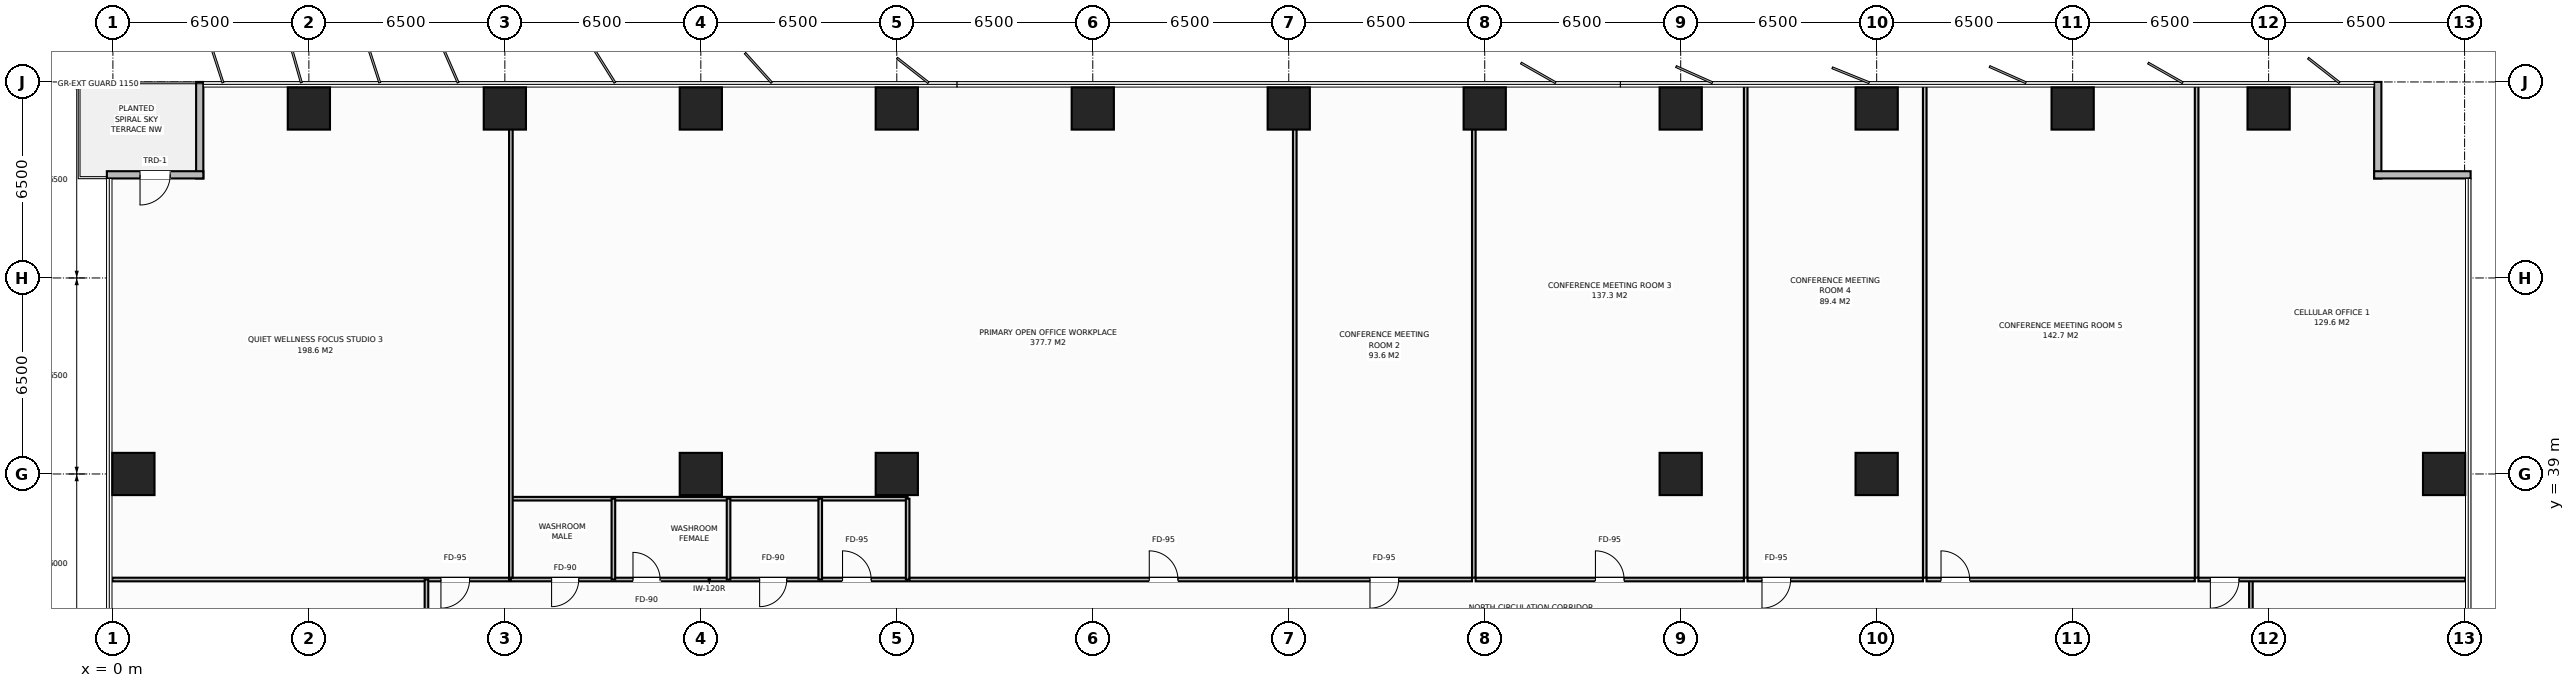
"""IFC4 building model, lengths in metres.
Left out: names, types, materials, properties, quantities, classifications, styles, units other than length and angle.
Written with IfcOpenShell. Run it as: python <this file> out.ifc"""

import sys

from ifc_helpers import new_model, si_unit, direction, frame, frame_2d, origin, origin_2d, place, context, subcontext, project, spatial, rectangle, extrude, element, fill, save


model = new_model("IFC4")
c1 = context("Model", 3, precision=1e-05, world=origin(), true_north=direction((0.0, 1.0)))
c2 = subcontext(c1, "Body", "Model", "MODEL_VIEW")
j1 = project(units=[si_unit("LENGTHUNIT", "METRE"), si_unit("PLANEANGLEUNIT", "RADIAN")], contexts=[c1])
p1 = place(None, origin())
s1 = spatial("IfcSite", under=j1, at=p1, CompositionType="ELEMENT")
p2 = place(p1, origin())
s2 = spatial("IfcBuilding", under=s1, at=p2, CompositionType="ELEMENT")
p3 = place(p2, frame((0.0, 0.0, 73.4)))
s3 = spatial("IfcBuildingStorey", under=s2, at=p3, CompositionType="ELEMENT", Elevation=73.4)
for number, where, z_axis, x_axis in (
    (1, (19.5, 39.0, 0.0), (0.0, 0.0, 1.0), (1.0, 0.0, 0.0)),
    (2, (58.5, 39.0, 0.0), (0.0, 0.0, 1.0), (1.0, 0.0, 0.0)),
    (3, (26.0, 39.0, 0.0), (0.0, 0.0, 1.0), (1.0, 0.0, 0.0)),
    (4, (52.0, 39.0, 0.0), (0.0, 0.0, 1.0), (1.0, 0.0, 0.0)),
    (5, (6.5, 51.12, 0.0), (0.0, 0.0, 1.0), (1.0, 0.0, 0.0)),
    (6, (13.0, 51.12, 0.0), (0.0, 0.0, 1.0), (1.0, 0.0, 0.0)),
    (7, (19.5, 51.12, 0.0), (0.0, 0.0, 1.0), (1.0, 0.0, 0.0)),
    (8, (26.0, 51.12, 0.0), (0.0, 0.0, 1.0), (1.0, 0.0, 0.0)),
    (9, (32.5, 51.12, 0.0), (0.0, 0.0, 1.0), (1.0, 0.0, 0.0)),
    (10, (39.0, 51.12, 0.0), (0.0, 0.0, 1.0), (1.0, 0.0, 0.0)),
    (11, (45.5, 51.12, 0.0), (0.0, 0.0, 1.0), (1.0, 0.0, 0.0)),
    (12, (52.0, 51.12, 0.0), (0.0, 0.0, 1.0), (1.0, 0.0, 0.0)),
    (13, (58.5, 51.12, 0.0), (0.0, 0.0, 1.0), (1.0, 0.0, 0.0)),
    (14, (65.0, 51.12, 0.0), (0.0, 0.0, 1.0), (1.0, 0.0, 0.0)),
    (15, (71.5, 51.12, 0.0), (0.0, 0.0, 1.0), (1.0, 0.0, 0.0)),
    (16, (0.68, 39.0, 0.0), (0.0, 0.0, 1.0), (1.0, 0.0, 0.0)),
    (17, (77.32, 39.0, 0.0), (0.0, 0.0, 1.0), (1.0, 0.0, 0.0)),
):
    element("IfcColumn", number, at=place(p3, frame(where, z_axis=z_axis, x_axis=x_axis)), inside=s3, PredefinedType="COLUMN", context=c2, shape_type="SweptSolid", body=[
        extrude(rectangle(XDim=1.4, YDim=1.4, at=origin_2d()), origin(), (0.0, 0.0, 1.0), 3.8),
    ])
p4 = place(p3, frame((2.88, 48.8, 0.0), z_axis=(0.0, 0.0, 1.0), x_axis=(0.0, 1.0, 0.0)))
e18 = element("IfcWall", 18, at=p4, inside=s3, PredefinedType="STANDARD", context=c2, shape_type="SweptSolid", body=[
    extrude(rectangle(XDim=3.2, YDim=0.24, at=frame_2d((1.6, 0.0))), origin(), (0.0, 0.0, 1.0), 3.55),
])
p5 = place(p3, frame((-0.2, 48.92, 0.0), z_axis=(0.0, 0.0, 1.0), x_axis=(1.0, 0.0, 0.0)))
e19 = element("IfcWall", 19, at=p5, inside=s3, PredefinedType="STANDARD", context=c2, shape_type="SweptSolid", body=[
    extrude(rectangle(XDim=3.2, YDim=0.24, at=frame_2d((1.6, 0.0))), origin(), (0.0, 0.0, 1.0), 3.55),
])
p6 = place(p5, frame((1.1, 0.0, 0.0)))
e20 = element("IfcOpeningElement", 20, at=p6, cuts=e19, PredefinedType="OPENING", context=c2, shape_type="SweptSolid", body=[
    extrude(rectangle(XDim=1.0, YDim=2.2, at=frame_2d((0.5, 1.1))), frame((0.0, 0.13, 0.0), z_axis=(0.0, -1.0, 0.0), x_axis=(1.0, 0.0, 0.0)), (0.0, 0.0, 1.0), 0.26),
])
for number, where, z_axis, x_axis in (
    (21, (75.12, 52.0, 0.0), (0.0, 0.0, 1.0), (0.0, -1.0, 0.0)),
    (22, (75.0, 48.92, 0.0), (0.0, 0.0, 1.0), (1.0, 0.0, 0.0)),
):
    element("IfcWall", number, at=place(p3, frame(where, z_axis=z_axis, x_axis=x_axis)), inside=s3, PredefinedType="STANDARD", context=c2, shape_type="SweptSolid", body=[
        extrude(rectangle(XDim=3.2, YDim=0.24, at=frame_2d((1.6, 0.0))), origin(), (0.0, 0.0, 1.0), 3.55),
    ])
p7 = place(p3, frame((70.912, 33.4, 0.0), z_axis=(0.0, 0.0, 1.0), x_axis=(0.0, 1.0, 0.0)))
e23 = element("IfcWall", 23, at=p7, inside=s3, PredefinedType="PARTITIONING", context=c2, shape_type="SweptSolid", body=[
    extrude(rectangle(XDim=2.1, YDim=0.12, at=frame_2d((1.05, 0.0))), origin(), (0.0, 0.0, 1.0), 3.55),
])
p8 = place(p3, frame((13.2, 35.5, 0.0), z_axis=(0.0, 0.0, 1.0), x_axis=(1.0, 0.0, 0.0)))
e24 = element("IfcWall", 24, at=p8, inside=s3, PredefinedType="PARTITIONING", context=c2, shape_type="SweptSolid", body=[
    extrude(rectangle(XDim=13.16, YDim=0.12, at=frame_2d((6.58, 0.0))), origin(), (0.0, 0.0, 1.0), 3.55),
])
p9 = place(p8, frame((1.35, 0.0, 0.0)))
e25 = element("IfcOpeningElement", 25, at=p9, cuts=e24, PredefinedType="OPENING", context=c2, shape_type="SweptSolid", body=[
    extrude(rectangle(XDim=0.9, YDim=2.15, at=frame_2d((0.45, 1.075))), frame((0.0, 0.07, 0.0), z_axis=(0.0, -1.0, 0.0), x_axis=(1.0, 0.0, 0.0)), (0.0, 0.0, 1.0), 0.14),
])
p10 = place(p8, frame((4.05, 0.0, 0.0)))
e26 = element("IfcOpeningElement", 26, at=p10, cuts=e24, PredefinedType="OPENING", context=c2, shape_type="SweptSolid", body=[
    extrude(rectangle(XDim=0.9, YDim=2.15, at=frame_2d((0.45, 1.075))), frame((0.0, 0.07, 0.0), z_axis=(0.0, -1.0, 0.0), x_axis=(1.0, 0.0, 0.0)), (0.0, 0.0, 1.0), 0.14),
])
p11 = place(p8, frame((8.25, 0.0, 0.0)))
e27 = element("IfcOpeningElement", 27, at=p11, cuts=e24, PredefinedType="OPENING", context=c2, shape_type="SweptSolid", body=[
    extrude(rectangle(XDim=0.9, YDim=2.15, at=frame_2d((0.45, 1.075))), frame((0.0, 0.07, 0.0), z_axis=(0.0, -1.0, 0.0), x_axis=(1.0, 0.0, 0.0)), (0.0, 0.0, 1.0), 0.14),
])
p12 = place(p8, frame((11.0, 0.0, 0.0)))
e28 = element("IfcOpeningElement", 28, at=p12, cuts=e24, PredefinedType="OPENING", context=c2, shape_type="SweptSolid", body=[
    extrude(rectangle(XDim=0.95, YDim=2.15, at=frame_2d((0.475, 1.075))), frame((0.0, 0.07, 0.0), z_axis=(0.0, -1.0, 0.0), x_axis=(1.0, 0.0, 0.0)), (0.0, 0.0, 1.0), 0.14),
])
p13 = place(p3, frame((13.2, 38.18, 0.0), z_axis=(0.0, 0.0, 1.0), x_axis=(1.0, 0.0, 0.0)))
e29 = element("IfcWall", 29, at=p13, inside=s3, PredefinedType="PARTITIONING", context=c2, shape_type="SweptSolid", body=[
    extrude(rectangle(XDim=13.16, YDim=0.12, at=frame_2d((6.58, 0.0))), origin(), (0.0, 0.0, 1.0), 3.55),
])
for number, where, z_axis, x_axis in (
    (30, (16.6, 35.5, 0.0), (0.0, 0.0, 1.0), (0.0, 1.0, 0.0)),
    (31, (20.42, 35.5, 0.0), (0.0, 0.0, 1.0), (0.0, 1.0, 0.0)),
    (32, (23.46, 35.5, 0.0), (0.0, 0.0, 1.0), (0.0, 1.0, 0.0)),
    (33, (26.36, 35.5, 0.0), (0.0, 0.0, 1.0), (0.0, 1.0, 0.0)),
):
    element("IfcWall", number, at=place(p3, frame(where, z_axis=z_axis, x_axis=x_axis)), inside=s3, PredefinedType="PARTITIONING", context=c2, shape_type="SweptSolid", body=[
        extrude(rectangle(XDim=2.68, YDim=0.12, at=frame_2d((1.34, 0.0))), origin(), (0.0, 0.0, 1.0), 3.55),
    ])
p14 = place(p3, frame((13.2, 35.56, 0.0), z_axis=(0.0, 0.0, 1.0), x_axis=(0.0, 1.0, 0.0)))
e34 = element("IfcWall", 34, at=p14, inside=s3, PredefinedType="PARTITIONING", context=c2, shape_type="SweptSolid", body=[
    extrude(rectangle(XDim=16.42, YDim=0.12, at=frame_2d((8.21, 0.0))), origin(), (0.0, 0.0, 1.0), 2.9),
])
p15 = place(p3, frame((-0.02, 35.5, 0.0), z_axis=(0.0, 0.0, 1.0), x_axis=(1.0, 0.0, 0.0)))
e35 = element("IfcWall", 35, at=p15, inside=s3, PredefinedType="PARTITIONING", context=c2, shape_type="SweptSolid", body=[
    extrude(rectangle(XDim=13.16, YDim=0.12, at=frame_2d((6.58, 0.0))), origin(), (0.0, 0.0, 1.0), 3.55),
])
p16 = place(p15, frame((10.9, 0.0, 0.0)))
e36 = element("IfcOpeningElement", 36, at=p16, cuts=e35, PredefinedType="OPENING", context=c2, shape_type="SweptSolid", body=[
    extrude(rectangle(XDim=0.95, YDim=2.15, at=frame_2d((0.475, 1.075))), frame((0.0, 0.07, 0.0), z_axis=(0.0, -1.0, 0.0), x_axis=(1.0, 0.0, 0.0)), (0.0, 0.0, 1.0), 0.14),
])
p17 = place(p3, frame((39.2, 35.56, 0.0), z_axis=(0.0, 0.0, 1.0), x_axis=(0.0, 1.0, 0.0)))
e37 = element("IfcWall", 37, at=p17, inside=s3, PredefinedType="PARTITIONING", context=c2, shape_type="SweptSolid", body=[
    extrude(rectangle(XDim=16.42, YDim=0.12, at=frame_2d((8.21, 0.0))), origin(), (0.0, 0.0, 1.0), 2.9),
])
p18 = place(p3, frame((26.42, 35.5, 0.0), z_axis=(0.0, 0.0, 1.0), x_axis=(1.0, 0.0, 0.0)))
e38 = element("IfcWall", 38, at=p18, inside=s3, PredefinedType="PARTITIONING", context=c2, shape_type="SweptSolid", body=[
    extrude(rectangle(XDim=12.72, YDim=0.12, at=frame_2d((6.36, 0.0))), origin(), (0.0, 0.0, 1.0), 3.55),
])
p19 = place(p18, frame((7.954, 0.0, 0.0)))
e39 = element("IfcOpeningElement", 39, at=p19, cuts=e38, PredefinedType="OPENING", context=c2, shape_type="SweptSolid", body=[
    extrude(rectangle(XDim=0.95, YDim=2.15, at=frame_2d((0.475, 1.075))), frame((0.0, 0.07, 0.0), z_axis=(0.0, -1.0, 0.0), x_axis=(1.0, 0.0, 0.0)), (0.0, 0.0, 1.0), 0.14),
])
p20 = place(p3, frame((45.138, 35.56, 0.0), z_axis=(0.0, 0.0, 1.0), x_axis=(0.0, 1.0, 0.0)))
e40 = element("IfcWall", 40, at=p20, inside=s3, PredefinedType="PARTITIONING", context=c2, shape_type="SweptSolid", body=[
    extrude(rectangle(XDim=16.42, YDim=0.12, at=frame_2d((8.21, 0.0))), origin(), (0.0, 0.0, 1.0), 3.55),
])
p21 = place(p3, frame((39.26, 35.5, 0.0), z_axis=(0.0, 0.0, 1.0), x_axis=(1.0, 0.0, 0.0)))
e41 = element("IfcWall", 41, at=p21, inside=s3, PredefinedType="PARTITIONING", context=c2, shape_type="SweptSolid", body=[
    extrude(rectangle(XDim=5.819, YDim=0.12, at=frame_2d((2.909, 0.0))), origin(), (0.0, 0.0, 1.0), 3.55),
])
p22 = place(p21, frame((2.434, 0.0, 0.0)))
e42 = element("IfcOpeningElement", 42, at=p22, cuts=e41, PredefinedType="OPENING", context=c2, shape_type="SweptSolid", body=[
    extrude(rectangle(XDim=0.95, YDim=2.15, at=frame_2d((0.475, 1.075))), frame((0.0, 0.07, 0.0), z_axis=(0.0, -1.0, 0.0), x_axis=(1.0, 0.0, 0.0)), (0.0, 0.0, 1.0), 0.14),
])
p23 = place(p3, frame((54.156, 35.56, 0.0), z_axis=(0.0, 0.0, 1.0), x_axis=(0.0, 1.0, 0.0)))
e43 = element("IfcWall", 43, at=p23, inside=s3, PredefinedType="PARTITIONING", context=c2, shape_type="SweptSolid", body=[
    extrude(rectangle(XDim=16.42, YDim=0.12, at=frame_2d((8.21, 0.0))), origin(), (0.0, 0.0, 1.0), 3.55),
])
p24 = place(p3, frame((45.198, 35.5, 0.0), z_axis=(0.0, 0.0, 1.0), x_axis=(1.0, 0.0, 0.0)))
e44 = element("IfcWall", 44, at=p24, inside=s3, PredefinedType="PARTITIONING", context=c2, shape_type="SweptSolid", body=[
    extrude(rectangle(XDim=8.898, YDim=0.12, at=frame_2d((4.449, 0.0))), origin(), (0.0, 0.0, 1.0), 3.55),
])
p25 = place(p24, frame((3.974, 0.0, 0.0)))
e45 = element("IfcOpeningElement", 45, at=p25, cuts=e44, PredefinedType="OPENING", context=c2, shape_type="SweptSolid", body=[
    extrude(rectangle(XDim=0.95, YDim=2.15, at=frame_2d((0.475, 1.075))), frame((0.0, 0.07, 0.0), z_axis=(0.0, -1.0, 0.0), x_axis=(1.0, 0.0, 0.0)), (0.0, 0.0, 1.0), 0.14),
])
p26 = place(p3, frame((60.094, 35.56, 0.0), z_axis=(0.0, 0.0, 1.0), x_axis=(0.0, 1.0, 0.0)))
e46 = element("IfcWall", 46, at=p26, inside=s3, PredefinedType="PARTITIONING", context=c2, shape_type="SweptSolid", body=[
    extrude(rectangle(XDim=16.42, YDim=0.12, at=frame_2d((8.21, 0.0))), origin(), (0.0, 0.0, 1.0), 3.55),
])
p27 = place(p3, frame((54.216, 35.5, 0.0), z_axis=(0.0, 0.0, 1.0), x_axis=(1.0, 0.0, 0.0)))
e47 = element("IfcWall", 47, at=p27, inside=s3, PredefinedType="PARTITIONING", context=c2, shape_type="SweptSolid", body=[
    extrude(rectangle(XDim=5.819, YDim=0.12, at=frame_2d((2.909, 0.0))), origin(), (0.0, 0.0, 1.0), 3.55),
])
p28 = place(p27, frame((0.48, 0.0, 0.0)))
e48 = element("IfcOpeningElement", 48, at=p28, cuts=e47, PredefinedType="OPENING", context=c2, shape_type="SweptSolid", body=[
    extrude(rectangle(XDim=0.95, YDim=2.15, at=frame_2d((0.475, 1.075))), frame((0.0, 0.07, 0.0), z_axis=(0.0, -1.0, 0.0), x_axis=(1.0, 0.0, 0.0)), (0.0, 0.0, 1.0), 0.14),
])
p29 = place(p3, frame((69.112, 35.56, 0.0), z_axis=(0.0, 0.0, 1.0), x_axis=(0.0, 1.0, 0.0)))
e49 = element("IfcWall", 49, at=p29, inside=s3, PredefinedType="PARTITIONING", context=c2, shape_type="SweptSolid", body=[
    extrude(rectangle(XDim=16.42, YDim=0.12, at=frame_2d((8.21, 0.0))), origin(), (0.0, 0.0, 1.0), 3.55),
])
p30 = place(p3, frame((60.155, 35.5, 0.0), z_axis=(0.0, 0.0, 1.0), x_axis=(1.0, 0.0, 0.0)))
e50 = element("IfcWall", 50, at=p30, inside=s3, PredefinedType="PARTITIONING", context=c2, shape_type="SweptSolid", body=[
    extrude(rectangle(XDim=8.898, YDim=0.12, at=frame_2d((4.449, 0.0))), origin(), (0.0, 0.0, 1.0), 3.55),
])
p31 = place(p30, frame((0.48, 0.0, 0.0)))
e51 = element("IfcOpeningElement", 51, at=p31, cuts=e50, PredefinedType="OPENING", context=c2, shape_type="SweptSolid", body=[
    extrude(rectangle(XDim=0.95, YDim=2.15, at=frame_2d((0.475, 1.075))), frame((0.0, 0.07, 0.0), z_axis=(0.0, -1.0, 0.0), x_axis=(1.0, 0.0, 0.0)), (0.0, 0.0, 1.0), 0.14),
])
p32 = place(p3, frame((69.172, 35.5, 0.0), z_axis=(0.0, 0.0, 1.0), x_axis=(1.0, 0.0, 0.0)))
e52 = element("IfcWall", 52, at=p32, inside=s3, PredefinedType="PARTITIONING", context=c2, shape_type="SweptSolid", body=[
    extrude(rectangle(XDim=8.848, YDim=0.12, at=frame_2d((4.424, 0.0))), origin(), (0.0, 0.0, 1.0), 3.55),
])
p33 = place(p32, frame((0.395, 0.0, 0.0)))
e53 = element("IfcOpeningElement", 53, at=p33, cuts=e52, PredefinedType="OPENING", context=c2, shape_type="SweptSolid", body=[
    extrude(rectangle(XDim=0.95, YDim=2.15, at=frame_2d((0.475, 1.075))), frame((0.0, 0.07, 0.0), z_axis=(0.0, -1.0, 0.0), x_axis=(1.0, 0.0, 0.0)), (0.0, 0.0, 1.0), 0.14),
])
p34 = place(p3, frame((10.4, 27.05, 0.0), z_axis=(0.0, 0.0, 1.0), x_axis=(0.0, 1.0, 0.0)))
e54 = element("IfcWall", 54, at=p34, inside=s3, PredefinedType="PARTITIONING", context=c2, shape_type="SweptSolid", body=[
    extrude(rectangle(XDim=8.45, YDim=0.12, at=frame_2d((4.225, 0.0))), origin(), (0.0, 0.0, 1.0), 3.55),
])
p35 = place(p34, frame((2.7, 0.0, 0.0)))
e55 = element("IfcOpeningElement", 55, at=p35, cuts=e54, PredefinedType="OPENING", context=c2, shape_type="SweptSolid", body=[
    extrude(rectangle(XDim=0.95, YDim=2.15, at=frame_2d((0.475, 1.075))), frame((0.0, 0.07, 0.0), z_axis=(0.0, -1.0, 0.0), x_axis=(1.0, 0.0, 0.0)), (0.0, 0.0, 1.0), 0.14),
])
p36 = place(p6, origin())
e56 = element("IfcDoor", 56, at=p36, inside=s3, OperationType="SINGLE_SWING_RIGHT", PredefinedType="DOOR", context=c2, shape_type="SweptSolid", body=[
    extrude(rectangle(XDim=1.0, YDim=2.2, at=frame_2d((0.5, 1.1))), frame((0.0, 0.025, 0.0), z_axis=(0.0, -1.0, 0.0), x_axis=(1.0, 0.0, 0.0)), (0.0, 0.0, 1.0), 0.05),
])
fill(e20, e56)
p37 = place(p9, origin())
e57 = element("IfcDoor", 57, at=p37, inside=s3, OperationType="SINGLE_SWING_RIGHT", PredefinedType="DOOR", context=c2, shape_type="SweptSolid", body=[
    extrude(rectangle(XDim=0.9, YDim=2.15, at=frame_2d((0.45, 1.075))), frame((0.0, 0.025, 0.0), z_axis=(0.0, -1.0, 0.0), x_axis=(1.0, 0.0, 0.0)), (0.0, 0.0, 1.0), 0.05),
])
fill(e25, e57)
p38 = place(p10, origin())
e58 = element("IfcDoor", 58, at=p38, inside=s3, OperationType="SINGLE_SWING_LEFT", PredefinedType="DOOR", context=c2, shape_type="SweptSolid", body=[
    extrude(rectangle(XDim=0.9, YDim=2.15, at=frame_2d((0.45, 1.075))), frame((0.0, 0.025, 0.0), z_axis=(0.0, -1.0, 0.0), x_axis=(1.0, 0.0, 0.0)), (0.0, 0.0, 1.0), 0.05),
])
fill(e26, e58)
p39 = place(p11, origin())
e59 = element("IfcDoor", 59, at=p39, inside=s3, OperationType="SINGLE_SWING_RIGHT", PredefinedType="DOOR", context=c2, shape_type="SweptSolid", body=[
    extrude(rectangle(XDim=0.9, YDim=2.15, at=frame_2d((0.45, 1.075))), frame((0.0, 0.025, 0.0), z_axis=(0.0, -1.0, 0.0), x_axis=(1.0, 0.0, 0.0)), (0.0, 0.0, 1.0), 0.05),
])
fill(e27, e59)
p40 = place(p12, origin())
e60 = element("IfcDoor", 60, at=p40, inside=s3, OperationType="SINGLE_SWING_LEFT", PredefinedType="DOOR", context=c2, shape_type="SweptSolid", body=[
    extrude(rectangle(XDim=0.95, YDim=2.15, at=frame_2d((0.475, 1.075))), frame((0.0, 0.025, 0.0), z_axis=(0.0, -1.0, 0.0), x_axis=(1.0, 0.0, 0.0)), (0.0, 0.0, 1.0), 0.05),
])
fill(e28, e60)
p41 = place(p16, origin())
e61 = element("IfcDoor", 61, at=p41, inside=s3, OperationType="SINGLE_SWING_RIGHT", PredefinedType="DOOR", context=c2, shape_type="SweptSolid", body=[
    extrude(rectangle(XDim=0.95, YDim=2.15, at=frame_2d((0.475, 1.075))), frame((0.0, 0.025, 0.0), z_axis=(0.0, -1.0, 0.0), x_axis=(1.0, 0.0, 0.0)), (0.0, 0.0, 1.0), 0.05),
])
fill(e36, e61)
p42 = place(p19, origin())
e62 = element("IfcDoor", 62, at=p42, inside=s3, OperationType="SINGLE_SWING_LEFT", PredefinedType="DOOR", context=c2, shape_type="SweptSolid", body=[
    extrude(rectangle(XDim=0.95, YDim=2.15, at=frame_2d((0.475, 1.075))), frame((0.0, 0.025, 0.0), z_axis=(0.0, -1.0, 0.0), x_axis=(1.0, 0.0, 0.0)), (0.0, 0.0, 1.0), 0.05),
])
fill(e39, e62)
p43 = place(p22, origin())
e63 = element("IfcDoor", 63, at=p43, inside=s3, OperationType="SINGLE_SWING_RIGHT", PredefinedType="DOOR", context=c2, shape_type="SweptSolid", body=[
    extrude(rectangle(XDim=0.95, YDim=2.15, at=frame_2d((0.475, 1.075))), frame((0.0, 0.025, 0.0), z_axis=(0.0, -1.0, 0.0), x_axis=(1.0, 0.0, 0.0)), (0.0, 0.0, 1.0), 0.05),
])
fill(e42, e63)
p44 = place(p25, origin())
e64 = element("IfcDoor", 64, at=p44, inside=s3, OperationType="SINGLE_SWING_LEFT", PredefinedType="DOOR", context=c2, shape_type="SweptSolid", body=[
    extrude(rectangle(XDim=0.95, YDim=2.15, at=frame_2d((0.475, 1.075))), frame((0.0, 0.025, 0.0), z_axis=(0.0, -1.0, 0.0), x_axis=(1.0, 0.0, 0.0)), (0.0, 0.0, 1.0), 0.05),
])
fill(e45, e64)
p45 = place(p28, origin())
e65 = element("IfcDoor", 65, at=p45, inside=s3, OperationType="SINGLE_SWING_RIGHT", PredefinedType="DOOR", context=c2, shape_type="SweptSolid", body=[
    extrude(rectangle(XDim=0.95, YDim=2.15, at=frame_2d((0.475, 1.075))), frame((0.0, 0.025, 0.0), z_axis=(0.0, -1.0, 0.0), x_axis=(1.0, 0.0, 0.0)), (0.0, 0.0, 1.0), 0.05),
])
fill(e48, e65)
p46 = place(p31, origin())
e66 = element("IfcDoor", 66, at=p46, inside=s3, OperationType="SINGLE_SWING_LEFT", PredefinedType="DOOR", context=c2, shape_type="SweptSolid", body=[
    extrude(rectangle(XDim=0.95, YDim=2.15, at=frame_2d((0.475, 1.075))), frame((0.0, 0.025, 0.0), z_axis=(0.0, -1.0, 0.0), x_axis=(1.0, 0.0, 0.0)), (0.0, 0.0, 1.0), 0.05),
])
fill(e51, e66)
p47 = place(p33, origin())
e67 = element("IfcDoor", 67, at=p47, inside=s3, OperationType="SINGLE_SWING_RIGHT", PredefinedType="DOOR", context=c2, shape_type="SweptSolid", body=[
    extrude(rectangle(XDim=0.95, YDim=2.15, at=frame_2d((0.475, 1.075))), frame((0.0, 0.025, 0.0), z_axis=(0.0, -1.0, 0.0), x_axis=(1.0, 0.0, 0.0)), (0.0, 0.0, 1.0), 0.05),
])
fill(e53, e67)
save(model, sys.argv[1])
